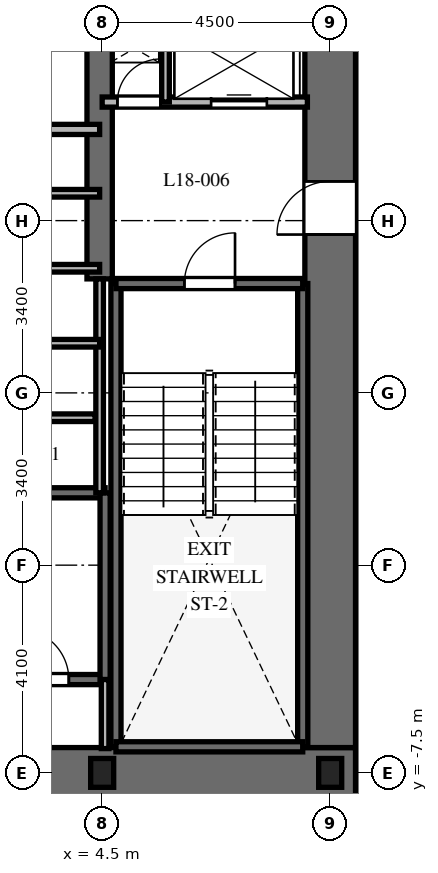
"""IFC4 building model, lengths in metres.
Left out: names, types, materials, properties, quantities, classifications, styles, units other than length and angle.
Written with IfcOpenShell. Run it as: python <this file> out.ifc"""

import sys

from ifc_helpers import new_model, si_unit, direction, frame, frame_2d, origin, origin_2d, place, context, subcontext, project, spatial, rectangle, i_section, extrude, element, fill, save


model = new_model("IFC4")
c1 = context("Model", 3, precision=1e-05, world=origin(), true_north=direction((0.0, 1.0)))
c2 = subcontext(c1, "Body", "Model", "MODEL_VIEW")
j1 = project(units=[si_unit("LENGTHUNIT", "METRE"), si_unit("PLANEANGLEUNIT", "RADIAN")], contexts=[c1])
p1 = place(None, origin())
s1 = spatial("IfcSite", under=j1, at=p1, CompositionType="ELEMENT")
p2 = place(p1, origin())
s2 = spatial("IfcBuilding", under=s1, at=p2, CompositionType="ELEMENT")
p3 = place(p2, frame((0.0, 0.0, 78.6)))
s3 = spatial("IfcBuildingStorey", under=s2, at=p3, CompositionType="ELEMENT", Elevation=78.6)
p4 = place(p3, frame((-9.5, -7.5, 0.0), z_axis=(0.0, 0.0, 1.0), x_axis=(1.0, 0.0, 0.0)))
e1 = element("IfcWall", 1, at=p4, inside=s3, PredefinedType="SHEAR", context=c2, shape_type="SweptSolid", body=[
    extrude(rectangle(XDim=19.0, YDim=1.0, at=frame_2d((9.5, 0.0))), origin(), (0.0, 0.0, 1.0), 3.7),
])
p5 = place(p4, frame((9.55, 0.0, 0.0)))
e2 = element("IfcOpeningElement", 2, at=p5, cuts=e1, PredefinedType="OPENING", context=c2, shape_type="SweptSolid", body=[
    extrude(rectangle(XDim=1.0, YDim=2.15, at=frame_2d((0.5, 1.075))), frame((0.0, 0.51, 0.0), z_axis=(0.0, -1.0, 0.0), x_axis=(1.0, 0.0, 0.0)), (0.0, 0.0, 1.0), 1.02),
])
p6 = place(p3, frame((9.0, -7.0, 0.0), z_axis=(0.0, 0.0, 1.0), x_axis=(0.0, 1.0, 0.0)))
e3 = element("IfcWall", 3, at=p6, inside=s3, PredefinedType="SHEAR", context=c2, shape_type="SweptSolid", body=[
    extrude(rectangle(XDim=14.0, YDim=1.0, at=frame_2d((7.0, 0.0))), origin(), (0.0, 0.0, 1.0), 3.7),
])
p7 = place(p6, frame((10.125, 0.0, 0.0)))
e4 = element("IfcOpeningElement", 4, at=p7, cuts=e3, PredefinedType="OPENING", context=c2, shape_type="SweptSolid", body=[
    extrude(rectangle(XDim=1.05, YDim=2.15, at=frame_2d((0.525, 1.075))), frame((0.0, 0.51, 0.0), z_axis=(0.0, -1.0, 0.0), x_axis=(1.0, 0.0, 0.0)), (0.0, 0.0, 1.0), 1.02),
])
p8 = place(p3, frame((4.45, 2.25, 0.0), z_axis=(0.0, 0.0, 1.0), x_axis=(0.0, 1.0, 0.0)))
e5 = element("IfcWall", 5, at=p8, inside=s3, PredefinedType="SHEAR", context=c2, shape_type="SweptSolid", body=[
    extrude(rectangle(XDim=4.75, YDim=0.5, at=frame_2d((2.375, 0.0))), origin(), (0.0, 0.0, 1.0), 3.7),
])
for number, where, z_axis, x_axis in (
    (6, (4.772, -6.985, 0.0), (0.0, 0.0, 1.0), (0.0, 1.0, 0.0)),
    (7, (8.458, -6.985, 0.0), (0.0, 0.0, 1.0), (0.0, 1.0, 0.0)),
):
    element("IfcWall", number, at=place(p3, frame(where, z_axis=z_axis, x_axis=x_axis)), inside=s3, PredefinedType="SHEAR", context=c2, shape_type="SweptSolid", body=[
        extrude(rectangle(XDim=9.143, YDim=0.2, at=frame_2d((4.572, 0.0))), origin(), (0.0, 0.0, 1.0), 3.7),
    ])
p9 = place(p3, frame((4.772, -6.985, 0.0), z_axis=(0.0, 0.0, 1.0), x_axis=(1.0, 0.0, 0.0)))
e8 = element("IfcWall", 8, at=p9, inside=s3, PredefinedType="SHEAR", context=c2, shape_type="SweptSolid", body=[
    extrude(rectangle(XDim=3.686, YDim=0.2, at=frame_2d((1.843, 0.0))), origin(), (0.0, 0.0, 1.0), 3.7),
])
p10 = place(p3, frame((4.772, 2.158, 0.0), z_axis=(0.0, 0.0, 1.0), x_axis=(1.0, 0.0, 0.0)))
e9 = element("IfcWall", 9, at=p10, inside=s3, PredefinedType="SHEAR", context=c2, shape_type="SweptSolid", body=[
    extrude(rectangle(XDim=3.686, YDim=0.2, at=frame_2d((1.843, 0.0))), origin(), (0.0, 0.0, 1.0), 3.7),
])
p11 = place(p10, frame((1.35, 0.0, 0.0)))
e10 = element("IfcOpeningElement", 10, at=p11, cuts=e9, PredefinedType="OPENING", context=c2, shape_type="SweptSolid", body=[
    extrude(rectangle(XDim=1.0, YDim=2.15, at=frame_2d((0.5, 1.075))), frame((0.0, 0.11, 0.0), z_axis=(0.0, -1.0, 0.0), x_axis=(1.0, 0.0, 0.0)), (0.0, 0.0, 1.0), 0.22),
])
p12 = place(p3, frame((-4.608, -5.658, 0.0), z_axis=(0.0, 0.0, 1.0), x_axis=(1.0, 0.0, 0.0)))
e11 = element("IfcWall", 11, at=p12, inside=s3, PredefinedType="SHEAR", context=c2, shape_type="SweptSolid", body=[
    extrude(rectangle(XDim=9.166, YDim=0.2, at=frame_2d((4.583, 0.0))), origin(), (0.0, 0.0, 1.0), 3.7),
])
p13 = place(p12, frame((7.45, 0.0, 0.0)))
e12 = element("IfcOpeningElement", 12, at=p13, cuts=e11, PredefinedType="OPENING", context=c2, shape_type="SweptSolid", body=[
    extrude(rectangle(XDim=1.0, YDim=2.15, at=frame_2d((0.5, 1.075))), frame((0.0, 0.11, 0.0), z_axis=(0.0, -1.0, 0.0), x_axis=(1.0, 0.0, 0.0)), (0.0, 0.0, 1.0), 0.22),
])
p14 = place(p3, frame((-4.608, -1.972, 0.0), z_axis=(0.0, 0.0, 1.0), x_axis=(1.0, 0.0, 0.0)))
e13 = element("IfcWall", 13, at=p14, inside=s3, PredefinedType="SHEAR", context=c2, shape_type="SweptSolid", body=[
    extrude(rectangle(XDim=9.166, YDim=0.2, at=frame_2d((4.583, 0.0))), origin(), (0.0, 0.0, 1.0), 3.7),
])
p15 = place(p3, frame((4.558, -5.658, 0.0), z_axis=(0.0, 0.0, 1.0), x_axis=(0.0, 1.0, 0.0)))
e14 = element("IfcWall", 14, at=p15, inside=s3, PredefinedType="SHEAR", context=c2, shape_type="SweptSolid", body=[
    extrude(rectangle(XDim=3.686, YDim=0.2, at=frame_2d((1.843, 0.0))), origin(), (0.0, 0.0, 1.0), 3.7),
])
for number, where, z_axis, x_axis in (
    (15, (4.5, -7.5, 0.0), (0.0, 0.0, 1.0), (1.0, 0.0, 0.0)),
    (16, (9.0, -7.5, 0.0), (0.0, 0.0, 1.0), (1.0, 0.0, 0.0)),
):
    element("IfcColumn", number, at=place(p3, frame(where, z_axis=z_axis, x_axis=x_axis)), inside=s3, PredefinedType="COLUMN", context=c2, shape_type="SweptSolid", body=[
        extrude(i_section(OverallWidth=0.454, OverallDepth=0.569, WebThickness=0.078, FlangeThickness=0.125, at=origin_2d()), origin(), (0.0, 0.0, 1.0), 3.7),
    ])
p16 = place(p3, frame((4.558, -7.02, 0.0), z_axis=(0.0, 0.0, 1.0), x_axis=(0.0, 1.0, 0.0)))
e17 = element("IfcWall", 17, at=p16, inside=s3, PredefinedType="PARTITIONING", context=c2, shape_type="SweptSolid", body=[
    extrude(rectangle(XDim=1.362, YDim=0.15, at=frame_2d((0.681, 0.0))), origin(), (0.0, 0.0, 1.0), 3.4),
])
p17 = place(p3, frame((4.5, 5.74, 0.0), z_axis=(0.0, 0.0, 1.0), x_axis=(1.0, 0.0, 0.0)))
e18 = element("IfcWall", 18, at=p17, inside=s3, PredefinedType="PARTITIONING", context=c2, shape_type="SweptSolid", body=[
    extrude(rectangle(XDim=4.05, YDim=0.2, at=frame_2d((2.025, 0.0))), origin(), (0.0, 0.0, 1.0), 3.4),
])
p18 = place(p17, frame((0.3, 0.0, 0.0)))
e19 = element("IfcOpeningElement", 19, at=p18, cuts=e18, PredefinedType="OPENING", context=c2, shape_type="SweptSolid", body=[
    extrude(rectangle(XDim=0.85, YDim=2.03, at=frame_2d((0.425, 1.015))), frame((0.0, 0.11, 0.0), z_axis=(0.0, -1.0, 0.0), x_axis=(1.0, 0.0, 0.0)), (0.0, 0.0, 1.0), 0.22),
])
p19 = place(p17, frame((2.15, 0.0, 0.0)))
e20 = element("IfcOpeningElement", 20, at=p19, cuts=e18, PredefinedType="OPENING", context=c2, shape_type="SweptSolid", body=[
    extrude(rectangle(XDim=1.1, YDim=2.2, at=frame_2d((0.55, 1.1))), frame((0.0, 0.11, 0.0), z_axis=(0.0, -1.0, 0.0), x_axis=(1.0, 0.0, 0.0)), (0.0, 0.0, 1.0), 0.22),
])
p20 = place(p3, frame((5.75, 5.74, 0.0), z_axis=(0.0, 0.0, 1.0), x_axis=(0.0, 1.0, 0.0)))
e21 = element("IfcWall", 21, at=p20, inside=s3, PredefinedType="PARTITIONING", context=c2, shape_type="SweptSolid", body=[
    extrude(rectangle(XDim=1.41, YDim=0.15, at=frame_2d((0.705, 0.0))), origin(), (0.0, 0.0, 1.0), 3.4),
])
p21 = place(p3, frame((1.85, 5.2, 0.0), z_axis=(0.0, 0.0, 1.0), x_axis=(1.0, 0.0, 0.0)))
e22 = element("IfcWall", 22, at=p21, inside=s3, PredefinedType="PARTITIONING", context=c2, shape_type="SweptSolid", body=[
    extrude(rectangle(XDim=2.6, YDim=0.2, at=frame_2d((1.3, 0.0))), origin(), (0.0, 0.0, 1.0), 3.4),
])
p22 = place(p3, frame((4.45, -1.972, 0.0), z_axis=(0.0, 0.0, 1.0), x_axis=(0.0, 1.0, 0.0)))
e23 = element("IfcWall", 23, at=p22, inside=s3, PredefinedType="PARTITIONING", context=c2, shape_type="SweptSolid", body=[
    extrude(rectangle(XDim=4.222, YDim=0.15, at=frame_2d((2.111, 0.0))), origin(), (0.0, 0.0, 1.0), 3.4),
])
for number, where, z_axis, x_axis in (
    (24, (1.9, 3.94, 0.0), (0.0, 0.0, 1.0), (1.0, 0.0, 0.0)),
    (25, (1.9, 0.98, 0.0), (0.0, 0.0, 1.0), (1.0, 0.0, 0.0)),
    (26, (1.9, 2.46, 0.0), (0.0, 0.0, 1.0), (1.0, 0.0, 0.0)),
):
    element("IfcWall", number, at=place(p3, frame(where, z_axis=z_axis, x_axis=x_axis)), inside=s3, PredefinedType="PARTITIONING", context=c2, shape_type="SweptSolid", body=[
        extrude(rectangle(XDim=2.55, YDim=0.15, at=frame_2d((1.275, 0.0))), origin(), (0.0, 0.0, 1.0), 3.4),
    ])
p23 = place(p3, frame((-4.36, -0.49, 0.0), z_axis=(0.0, 0.0, 1.0), x_axis=(1.0, 0.0, 0.0)))
e27 = element("IfcWall", 27, at=p23, inside=s3, PredefinedType="PARTITIONING", context=c2, shape_type="SweptSolid", body=[
    extrude(rectangle(XDim=8.72, YDim=0.15, at=frame_2d((4.36, 0.0))), origin(), (0.0, 0.0, 1.0), 3.4),
])
p24 = place(p23, frame((3.16, 0.0, 0.0)))
e28 = element("IfcOpeningElement", 28, at=p24, cuts=e27, PredefinedType="OPENING", context=c2, shape_type="SweptSolid", body=[
    extrude(rectangle(XDim=0.85, YDim=2.03, at=frame_2d((0.425, 1.015))), frame((0.0, 0.085, 0.0), z_axis=(0.0, -1.0, 0.0), x_axis=(1.0, 0.0, 0.0)), (0.0, 0.0, 1.0), 0.17),
])
p25 = place(p23, frame((5.21, 0.0, 0.0)))
e29 = element("IfcOpeningElement", 29, at=p25, cuts=e27, PredefinedType="OPENING", context=c2, shape_type="SweptSolid", body=[
    extrude(rectangle(XDim=0.85, YDim=2.03, at=frame_2d((0.425, 1.015))), frame((0.0, 0.085, 0.0), z_axis=(0.0, -1.0, 0.0), x_axis=(1.0, 0.0, 0.0)), (0.0, 0.0, 1.0), 0.17),
])
p26 = place(p11, origin())
e30 = element("IfcDoor", 30, at=p26, inside=s3, OperationType="SINGLE_SWING_RIGHT", PredefinedType="DOOR", context=c2, shape_type="SweptSolid", body=[
    extrude(rectangle(XDim=1.0, YDim=2.15, at=frame_2d((0.5, 1.075))), frame((0.0, 0.025, 0.0), z_axis=(0.0, -1.0, 0.0), x_axis=(1.0, 0.0, 0.0)), (0.0, 0.0, 1.0), 0.05),
])
fill(e10, e30)
p27 = place(p13, origin())
e31 = element("IfcDoor", 31, at=p27, inside=s3, OperationType="SINGLE_SWING_LEFT", PredefinedType="DOOR", context=c2, shape_type="SweptSolid", body=[
    extrude(rectangle(XDim=1.0, YDim=2.15, at=frame_2d((0.5, 1.075))), frame((0.0, 0.025, 0.0), z_axis=(0.0, -1.0, 0.0), x_axis=(1.0, 0.0, 0.0)), (0.0, 0.0, 1.0), 0.05),
])
fill(e12, e31)
p28 = place(p7, origin())
e32 = element("IfcDoor", 32, at=p28, inside=s3, OperationType="SINGLE_SWING_LEFT", PredefinedType="DOOR", context=c2, shape_type="SweptSolid", body=[
    extrude(rectangle(XDim=1.05, YDim=2.15, at=frame_2d((0.525, 1.075))), frame((0.0, 0.025, 0.0), z_axis=(0.0, -1.0, 0.0), x_axis=(1.0, 0.0, 0.0)), (0.0, 0.0, 1.0), 0.05),
])
fill(e4, e32)
p29 = place(p18, origin())
e33 = element("IfcDoor", 33, at=p29, inside=s3, OperationType="SINGLE_SWING_RIGHT", PredefinedType="DOOR", context=c2, shape_type="SweptSolid", body=[
    extrude(rectangle(XDim=0.85, YDim=2.03, at=frame_2d((0.425, 1.015))), frame((0.0, 0.025, 0.0), z_axis=(0.0, -1.0, 0.0), x_axis=(1.0, 0.0, 0.0)), (0.0, 0.0, 1.0), 0.05),
])
fill(e19, e33)
p30 = place(p19, origin())
e34 = element("IfcDoor", 34, at=p30, inside=s3, OperationType="SLIDING_TO_RIGHT", PredefinedType="DOOR", context=c2, shape_type="SweptSolid", body=[
    extrude(rectangle(XDim=1.1, YDim=2.2, at=frame_2d((0.55, 1.1))), frame((0.0, 0.025, 0.0), z_axis=(0.0, -1.0, 0.0), x_axis=(1.0, 0.0, 0.0)), (0.0, 0.0, 1.0), 0.05),
])
fill(e20, e34)
save(model, sys.argv[1])
